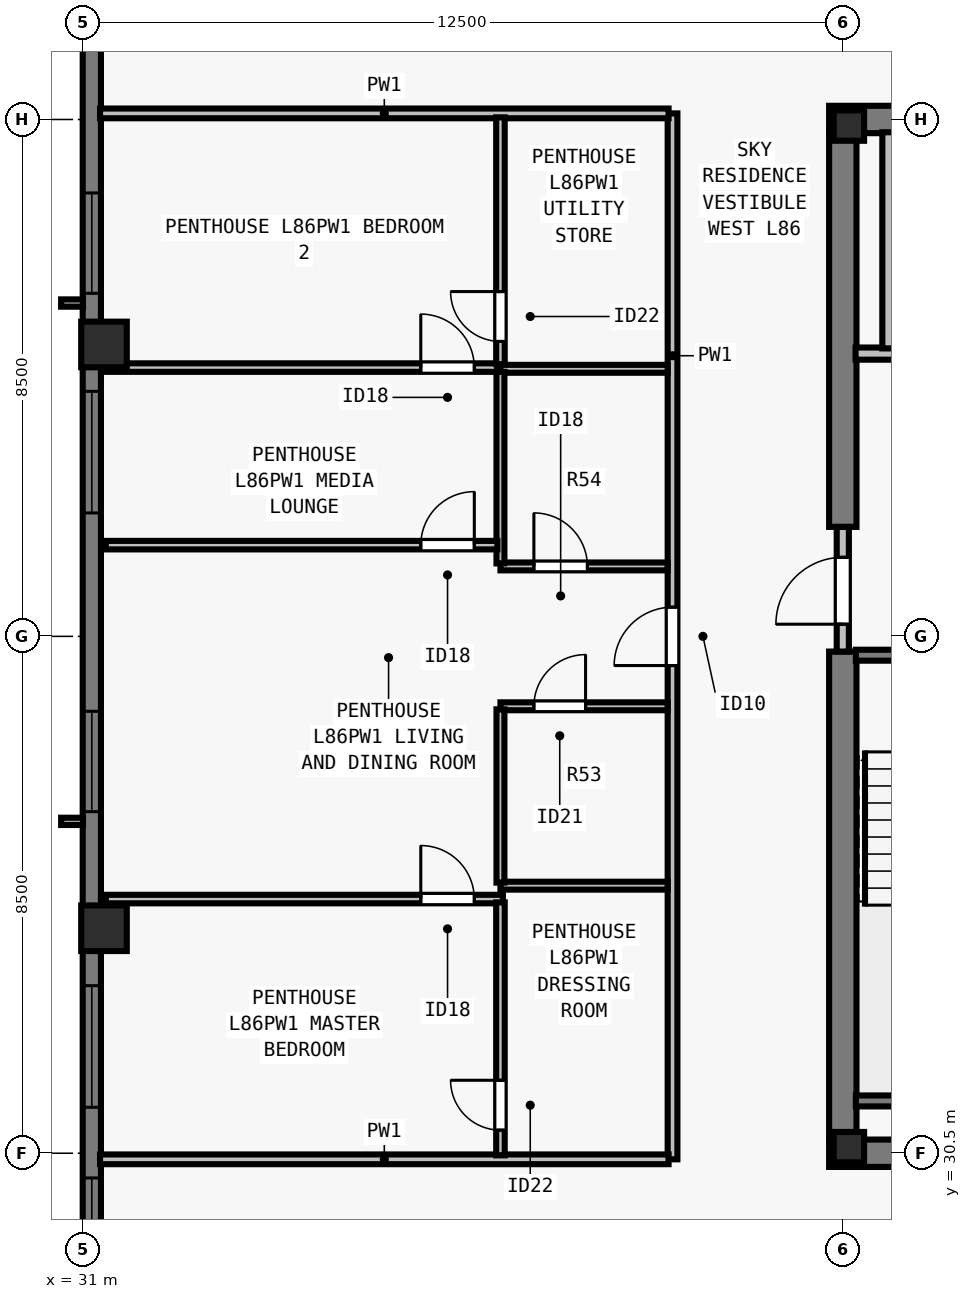
"""IFC4 building model, lengths in metres.
Left out: names, types, materials, properties, quantities, classifications, styles, units other than length and angle.
Written with IfcOpenShell. Run it as: python <this file> out.ifc"""

import sys

from ifc_helpers import new_model, si_unit, direction, frame, frame_2d, origin, origin_2d, place, context, subcontext, project, spatial, rectangle, i_section, extrude, element, fill, save


model = new_model("IFC4")
c1 = context("Model", 3, precision=1e-05, world=origin(), true_north=direction((0.0, 1.0)))
c2 = subcontext(c1, "Body", "Model", "MODEL_VIEW")
j1 = project(units=[si_unit("LENGTHUNIT", "METRE"), si_unit("PLANEANGLEUNIT", "RADIAN")], contexts=[c1])
p1 = place(None, origin())
s1 = spatial("IfcSite", under=j1, at=p1, CompositionType="ELEMENT")
p2 = place(p1, origin())
s2 = spatial("IfcBuilding", under=s1, at=p2, CompositionType="ELEMENT")
p3 = place(p2, frame((0.0, 0.0, 312.0)))
s3 = spatial("IfcBuildingStorey", under=s2, at=p3, CompositionType="ELEMENT", Elevation=312.0)
for number, where, z_axis, x_axis in (
    (1, (43.6, 30.6, 0.0), (0.0, 0.0, 1.0), (1.0, 0.0, 0.0)),
    (2, (43.6, 47.4, 0.0), (0.0, 0.0, 1.0), (1.0, 0.0, 0.0)),
):
    element("IfcColumn", number, at=place(p3, frame(where, z_axis=z_axis, x_axis=x_axis)), inside=s3, PredefinedType="COLUMN", context=c2, shape_type="SweptSolid", body=[
        extrude(i_section(OverallWidth=0.5, OverallDepth=0.5, WebThickness=0.028, FlangeThickness=0.045, at=origin_2d()), origin(), (0.0, 0.0, 1.0), 3.5),
    ])
for number, where, z_axis, x_axis in (
    (3, (31.35, 43.8, 0.0), (0.0, 0.0, 1.0), (0.0, 1.0, 0.0)),
    (4, (31.35, 34.2, 0.0), (0.0, 0.0, 1.0), (0.0, 1.0, 0.0)),
):
    element("IfcColumn", number, at=place(p3, frame(where, z_axis=z_axis, x_axis=x_axis)), inside=s3, PredefinedType="COLUMN", context=c2, shape_type="SweptSolid", body=[
        extrude(rectangle(XDim=0.75, YDim=0.75, at=origin_2d()), origin(), (0.0, 0.0, 1.0), 3.5),
    ])
p4 = place(p3, frame((31.15, 23.5, 0.0), z_axis=(0.0, 0.0, 1.0), x_axis=(0.0, 1.0, 0.0)))
e5 = element("IfcWall", 5, at=p4, inside=s3, PredefinedType="SOLIDWALL", context=c2, shape_type="SweptSolid", body=[
    extrude(rectangle(XDim=30.722, YDim=0.3, at=frame_2d((15.361, 0.0))), origin(), (0.0, 0.0, 1.0), 3.29),
])
p5 = place(p4, frame((4.944, 0.0, 0.8)))
e6 = element("IfcOpeningElement", 6, at=p5, cuts=e5, PredefinedType="OPENING", context=c2, shape_type="SweptSolid", body=[
    extrude(rectangle(XDim=1.65, YDim=1.758, at=frame_2d((0.825, 0.879))), frame((0.0, 0.16, 0.0), z_axis=(0.0, -1.0, 0.0), x_axis=(1.0, 0.0, 0.0)), (0.0, 0.0, 1.0), 0.32),
])
p6 = place(p4, frame((7.756, 0.0, 0.8)))
e7 = element("IfcOpeningElement", 7, at=p6, cuts=e5, PredefinedType="OPENING", context=c2, shape_type="SweptSolid", body=[
    extrude(rectangle(XDim=2.0, YDim=1.758, at=frame_2d((1.0, 0.879))), frame((0.0, 0.16, 0.0), z_axis=(0.0, -1.0, 0.0), x_axis=(1.0, 0.0, 0.0)), (0.0, 0.0, 1.0), 0.32),
])
p7 = place(p4, frame((12.617, 0.0, 0.8)))
e8 = element("IfcOpeningElement", 8, at=p7, cuts=e5, PredefinedType="OPENING", context=c2, shape_type="SweptSolid", body=[
    extrude(rectangle(XDim=1.65, YDim=1.758, at=frame_2d((0.825, 0.879))), frame((0.0, 0.16, 0.0), z_axis=(0.0, -1.0, 0.0), x_axis=(1.0, 0.0, 0.0)), (0.0, 0.0, 1.0), 0.32),
])
p8 = place(p4, frame((17.53, 0.0, 0.8)))
e9 = element("IfcOpeningElement", 9, at=p8, cuts=e5, PredefinedType="OPENING", context=c2, shape_type="SweptSolid", body=[
    extrude(rectangle(XDim=2.0, YDim=1.758, at=frame_2d((1.0, 0.879))), frame((0.0, 0.16, 0.0), z_axis=(0.0, -1.0, 0.0), x_axis=(1.0, 0.0, 0.0)), (0.0, 0.0, 1.0), 0.32),
])
p9 = place(p4, frame((21.142, 0.0, 0.8)))
e10 = element("IfcOpeningElement", 10, at=p9, cuts=e5, PredefinedType="OPENING", context=c2, shape_type="SweptSolid", body=[
    extrude(rectangle(XDim=1.65, YDim=1.758, at=frame_2d((0.825, 0.879))), frame((0.0, 0.16, 0.0), z_axis=(0.0, -1.0, 0.0), x_axis=(1.0, 0.0, 0.0)), (0.0, 0.0, 1.0), 0.32),
])
p10 = place(p4, frame((26.87, 0.0, 0.8)))
e11 = element("IfcOpeningElement", 11, at=p10, cuts=e5, PredefinedType="OPENING", context=c2, shape_type="SweptSolid", body=[
    extrude(rectangle(XDim=0.9, YDim=1.75, at=frame_2d((0.45, 0.875))), frame((0.0, 0.16, 0.0), z_axis=(0.0, -1.0, 0.0), x_axis=(1.0, 0.0, 0.0)), (0.0, 0.0, 1.0), 0.32),
])
for number, where, z_axis, x_axis in (
    (12, (43.275, 30.5, 0.0), (0.0, 0.0, 1.0), (1.0, 0.0, 0.0)),
    (13, (43.275, 47.5, 0.0), (0.0, 0.0, 1.0), (1.0, 0.0, 0.0)),
):
    element("IfcWall", number, at=place(p3, frame(where, z_axis=z_axis, x_axis=x_axis)), inside=s3, PredefinedType="SHEAR", context=c2, shape_type="SweptSolid", body=[
        extrude(rectangle(XDim=17.45, YDim=0.45, at=frame_2d((8.725, 0.0))), origin(), (0.0, 0.0, 1.0), 3.29),
    ])
p11 = place(p3, frame((43.5, 30.715, 0.0), z_axis=(0.0, 0.0, 1.0), x_axis=(0.0, 1.0, 0.0)))
e14 = element("IfcWall", 14, at=p11, inside=s3, PredefinedType="SHEAR", context=c2, shape_type="SweptSolid", body=[
    extrude(rectangle(XDim=8.035, YDim=0.45, at=frame_2d((4.018, 0.0))), origin(), (0.0, 0.0, 1.0), 3.29),
])
p12 = place(p3, frame((43.5, 40.8, 0.0), z_axis=(0.0, 0.0, 1.0), x_axis=(0.0, 1.0, 0.0)))
e15 = element("IfcWall", 15, at=p12, inside=s3, PredefinedType="SHEAR", context=c2, shape_type="SweptSolid", body=[
    extrude(rectangle(XDim=6.485, YDim=0.45, at=frame_2d((3.242, 0.0))), origin(), (0.0, 0.0, 1.0), 3.29),
])
p13 = place(p3, frame((43.5, 38.75, 0.0), z_axis=(0.0, 0.0, 1.0), x_axis=(0.0, 1.0, 0.0)))
e16 = element("IfcWall", 16, at=p13, inside=s3, PredefinedType="SOLIDWALL", context=c2, shape_type="SweptSolid", body=[
    extrude(rectangle(XDim=2.05, YDim=0.2, at=frame_2d((1.025, 0.0))), origin(), (0.0, 0.0, 1.0), 3.29),
])
p14 = place(p13, frame((0.45, 0.0, 0.0)))
e17 = element("IfcOpeningElement", 17, at=p14, cuts=e16, PredefinedType="OPENING", context=c2, shape_type="SweptSolid", body=[
    extrude(rectangle(XDim=1.1, YDim=2.15, at=frame_2d((0.55, 1.075))), frame((0.0, 0.11, 0.0), z_axis=(0.0, -1.0, 0.0), x_axis=(1.0, 0.0, 0.0)), (0.0, 0.0, 1.0), 0.22),
])
p15 = place(p3, frame((43.71, 43.65, 0.0), z_axis=(0.0, 0.0, 1.0), x_axis=(1.0, 0.0, 0.0)))
e18 = element("IfcWall", 18, at=p15, inside=s3, PredefinedType="SOLIDWALL", context=c2, shape_type="SweptSolid", body=[
    extrude(rectangle(XDim=3.555, YDim=0.2, at=frame_2d((1.777, 0.0))), origin(), (0.0, 0.0, 1.0), 3.29),
])
p16 = place(p15, frame((1.16, 0.0, 0.0)))
e19 = element("IfcOpeningElement", 19, at=p16, cuts=e18, PredefinedType="OPENING", context=c2, shape_type="SweptSolid", body=[
    extrude(rectangle(XDim=1.1, YDim=2.2, at=frame_2d((0.55, 1.1))), frame((0.0, 0.11, 0.0), z_axis=(0.0, -1.0, 0.0), x_axis=(1.0, 0.0, 0.0)), (0.0, 0.0, 1.0), 0.22),
])
p17 = place(p3, frame((44.25, 43.735, 0.0), z_axis=(0.0, 0.0, 1.0), x_axis=(0.0, 1.0, 0.0)))
e20 = element("IfcWall", 20, at=p17, inside=s3, PredefinedType="SOLIDWALL", context=c2, shape_type="SweptSolid", body=[
    extrude(rectangle(XDim=3.555, YDim=0.2, at=frame_2d((1.777, 0.0))), origin(), (0.0, 0.0, 1.0), 3.29),
])
p18 = place(p3, frame((40.7, 30.4, 0.0), z_axis=(0.0, 0.0, 1.0), x_axis=(0.0, 1.0, 0.0)))
e21 = element("IfcWall", 21, at=p18, inside=s3, PredefinedType="PARTITIONING", context=c2, shape_type="SweptSolid", body=[
    extrude(rectangle(XDim=17.2, YDim=0.16, at=frame_2d((8.6, 0.0))), origin(), (0.0, 0.0, 1.0), 3.009),
])
p19 = place(p18, frame((8.12, 0.0, 0.0)))
e22 = element("IfcOpeningElement", 22, at=p19, cuts=e21, PredefinedType="OPENING", context=c2, shape_type="SweptSolid", body=[
    extrude(rectangle(XDim=0.96, YDim=2.18, at=frame_2d((0.48, 1.09))), frame((0.0, 0.09, 0.0), z_axis=(0.0, -1.0, 0.0), x_axis=(1.0, 0.0, 0.0)), (0.0, 0.0, 1.0), 0.18),
])
for number, where, z_axis, x_axis in (
    (23, (31.285, 30.4, 0.0), (0.0, 0.0, 1.0), (1.0, 0.0, 0.0)),
    (24, (31.285, 47.6, 0.0), (0.0, 0.0, 1.0), (1.0, 0.0, 0.0)),
):
    element("IfcWall", number, at=place(p3, frame(where, z_axis=z_axis, x_axis=x_axis)), inside=s3, PredefinedType="PARTITIONING", context=c2, shape_type="SweptSolid", body=[
        extrude(rectangle(XDim=9.35, YDim=0.16, at=frame_2d((4.675, 0.0))), origin(), (0.0, 0.0, 1.0), 3.29),
    ])
p20 = place(p3, frame((37.87, 34.9, 0.0), z_axis=(0.0, 0.0, 1.0), x_axis=(1.0, 0.0, 0.0)))
e25 = element("IfcWall", 25, at=p20, inside=s3, PredefinedType="PLUMBINGWALL", context=c2, shape_type="SweptSolid", body=[
    extrude(rectangle(XDim=2.75, YDim=0.13, at=frame_2d((1.375, 0.0))), origin(), (0.0, 0.0, 1.0), 3.29),
])
p21 = place(p3, frame((37.87, 37.85, 0.0), z_axis=(0.0, 0.0, 1.0), x_axis=(1.0, 0.0, 0.0)))
e26 = element("IfcWall", 26, at=p21, inside=s3, PredefinedType="PLUMBINGWALL", context=c2, shape_type="SweptSolid", body=[
    extrude(rectangle(XDim=2.75, YDim=0.13, at=frame_2d((1.375, 0.0))), origin(), (0.0, 0.0, 1.0), 3.29),
])
p22 = place(p21, frame((0.55, 0.0, 0.0)))
e27 = element("IfcOpeningElement", 27, at=p22, cuts=e26, PredefinedType="OPENING", context=c2, shape_type="SweptSolid", body=[
    extrude(rectangle(XDim=0.85, YDim=2.08, at=frame_2d((0.425, 1.04))), frame((0.0, 0.075, 0.0), z_axis=(0.0, -1.0, 0.0), x_axis=(1.0, 0.0, 0.0)), (0.0, 0.0, 1.0), 0.15),
])
p23 = place(p3, frame((37.87, 34.95, 0.0), z_axis=(0.0, 0.0, 1.0), x_axis=(0.0, 1.0, 0.0)))
e28 = element("IfcWall", 28, at=p23, inside=s3, PredefinedType="PLUMBINGWALL", context=c2, shape_type="SweptSolid", body=[
    extrude(rectangle(XDim=2.85, YDim=0.13, at=frame_2d((1.425, 0.0))), origin(), (0.0, 0.0, 1.0), 3.29),
])
p24 = place(p3, frame((37.87, 43.4, 0.0), z_axis=(0.0, 0.0, 1.0), x_axis=(1.0, 0.0, 0.0)))
e29 = element("IfcWall", 29, at=p24, inside=s3, PredefinedType="PLUMBINGWALL", context=c2, shape_type="SweptSolid", body=[
    extrude(rectangle(XDim=2.75, YDim=0.13, at=frame_2d((1.375, 0.0))), origin(), (0.0, 0.0, 1.0), 3.29),
])
p25 = place(p3, frame((37.87, 40.15, 0.0), z_axis=(0.0, 0.0, 1.0), x_axis=(1.0, 0.0, 0.0)))
e30 = element("IfcWall", 30, at=p25, inside=s3, PredefinedType="PLUMBINGWALL", context=c2, shape_type="SweptSolid", body=[
    extrude(rectangle(XDim=2.75, YDim=0.13, at=frame_2d((1.375, 0.0))), origin(), (0.0, 0.0, 1.0), 3.29),
])
p26 = place(p25, frame((0.55, 0.0, 0.0)))
e31 = element("IfcOpeningElement", 31, at=p26, cuts=e30, PredefinedType="OPENING", context=c2, shape_type="SweptSolid", body=[
    extrude(rectangle(XDim=0.88, YDim=2.1, at=frame_2d((0.44, 1.05))), frame((0.0, 0.075, 0.0), z_axis=(0.0, -1.0, 0.0), x_axis=(1.0, 0.0, 0.0)), (0.0, 0.0, 1.0), 0.15),
])
p27 = place(p3, frame((37.87, 40.2, 0.0), z_axis=(0.0, 0.0, 1.0), x_axis=(0.0, 1.0, 0.0)))
e32 = element("IfcWall", 32, at=p27, inside=s3, PredefinedType="PLUMBINGWALL", context=c2, shape_type="SweptSolid", body=[
    extrude(rectangle(XDim=3.15, YDim=0.13, at=frame_2d((1.575, 0.0))), origin(), (0.0, 0.0, 1.0), 3.009),
])
p28 = place(p3, frame((31.38, 34.68, 0.0), z_axis=(0.0, 0.0, 1.0), x_axis=(1.0, 0.0, 0.0)))
e33 = element("IfcWall", 33, at=p28, inside=s3, PredefinedType="PARTITIONING", context=c2, shape_type="SweptSolid", body=[
    extrude(rectangle(XDim=6.53, YDim=0.14, at=frame_2d((3.265, 0.0))), origin(), (0.0, 0.0, 1.0), 3.29),
])
p29 = place(p28, frame((5.18, 0.0, 0.0)))
e34 = element("IfcOpeningElement", 34, at=p29, cuts=e33, PredefinedType="OPENING", context=c2, shape_type="SweptSolid", body=[
    extrude(rectangle(XDim=0.88, YDim=2.1, at=frame_2d((0.44, 1.05))), frame((0.0, 0.08, 0.0), z_axis=(0.0, -1.0, 0.0), x_axis=(1.0, 0.0, 0.0)), (0.0, 0.0, 1.0), 0.16),
])
p30 = place(p3, frame((37.87, 30.465, 0.0), z_axis=(0.0, 0.0, 1.0), x_axis=(0.0, 1.0, 0.0)))
e35 = element("IfcWall", 35, at=p30, inside=s3, PredefinedType="PARTITIONING", context=c2, shape_type="SweptSolid", body=[
    extrude(rectangle(XDim=4.16, YDim=0.14, at=frame_2d((2.08, 0.0))), origin(), (0.0, 0.0, 1.0), 3.29),
])
p31 = place(p30, frame((0.415, 0.0, 0.0)))
e36 = element("IfcOpeningElement", 36, at=p31, cuts=e35, PredefinedType="OPENING", context=c2, shape_type="SweptSolid", body=[
    extrude(rectangle(XDim=0.82, YDim=2.1, at=frame_2d((0.41, 1.05))), frame((0.0, 0.08, 0.0), z_axis=(0.0, -1.0, 0.0), x_axis=(1.0, 0.0, 0.0)), (0.0, 0.0, 1.0), 0.16),
])
p32 = place(p3, frame((31.38, 43.42, 0.0), z_axis=(0.0, 0.0, 1.0), x_axis=(1.0, 0.0, 0.0)))
e37 = element("IfcWall", 37, at=p32, inside=s3, PredefinedType="PARTITIONING", context=c2, shape_type="SweptSolid", body=[
    extrude(rectangle(XDim=6.44, YDim=0.14, at=frame_2d((3.22, 0.0))), origin(), (0.0, 0.0, 1.0), 3.29),
])
p33 = place(p32, frame((5.18, 0.0, 0.0)))
e38 = element("IfcOpeningElement", 38, at=p33, cuts=e37, PredefinedType="OPENING", context=c2, shape_type="SweptSolid", body=[
    extrude(rectangle(XDim=0.88, YDim=2.1, at=frame_2d((0.44, 1.05))), frame((0.0, 0.08, 0.0), z_axis=(0.0, -1.0, 0.0), x_axis=(1.0, 0.0, 0.0)), (0.0, 0.0, 1.0), 0.16),
])
p34 = place(p3, frame((37.87, 43.475, 0.0), z_axis=(0.0, 0.0, 1.0), x_axis=(0.0, 1.0, 0.0)))
e39 = element("IfcWall", 39, at=p34, inside=s3, PredefinedType="PARTITIONING", context=c2, shape_type="SweptSolid", body=[
    extrude(rectangle(XDim=4.06, YDim=0.14, at=frame_2d((2.03, 0.0))), origin(), (0.0, 0.0, 1.0), 3.29),
])
p35 = place(p34, frame((0.375, 0.0, 0.0)))
e40 = element("IfcOpeningElement", 40, at=p35, cuts=e39, PredefinedType="OPENING", context=c2, shape_type="SweptSolid", body=[
    extrude(rectangle(XDim=0.82, YDim=2.1, at=frame_2d((0.41, 1.05))), frame((0.0, 0.08, 0.0), z_axis=(0.0, -1.0, 0.0), x_axis=(1.0, 0.0, 0.0)), (0.0, 0.0, 1.0), 0.16),
])
p36 = place(p3, frame((31.38, 40.5, 0.0), z_axis=(0.0, 0.0, 1.0), x_axis=(1.0, 0.0, 0.0)))
e41 = element("IfcWall", 41, at=p36, inside=s3, PredefinedType="PARTITIONING", context=c2, shape_type="SweptSolid", body=[
    extrude(rectangle(XDim=6.44, YDim=0.14, at=frame_2d((3.22, 0.0))), origin(), (0.0, 0.0, 1.0), 3.29),
])
p37 = place(p36, frame((5.18, 0.0, 0.0)))
e42 = element("IfcOpeningElement", 42, at=p37, cuts=e41, PredefinedType="OPENING", context=c2, shape_type="SweptSolid", body=[
    extrude(rectangle(XDim=0.88, YDim=2.1, at=frame_2d((0.44, 1.05))), frame((0.0, 0.08, 0.0), z_axis=(0.0, -1.0, 0.0), x_axis=(1.0, 0.0, 0.0)), (0.0, 0.0, 1.0), 0.16),
])
p38 = place(p3, frame((43.715, 38.69, 0.0), z_axis=(0.0, 0.0, 1.0), x_axis=(1.0, 0.0, 0.0)))
e43 = element("IfcWall", 43, at=p38, inside=s3, PredefinedType="SOLIDWALL", context=c2, shape_type="SweptSolid", body=[
    extrude(rectangle(XDim=3.28, YDim=0.18, at=frame_2d((1.64, 0.0))), origin(), (0.0, 0.0, 1.0), 3.29),
])
p39 = place(p38, frame((1.165, 0.0, 0.0)))
e44 = element("IfcOpeningElement", 44, at=p39, cuts=e43, PredefinedType="OPENING", context=c2, shape_type="SweptSolid", body=[
    extrude(rectangle(XDim=0.95, YDim=2.15, at=frame_2d((0.475, 1.075))), frame((0.0, 0.1, 0.0), z_axis=(0.0, -1.0, 0.0), x_axis=(1.0, 0.0, 0.0)), (0.0, 0.0, 1.0), 0.2),
])
p40 = place(p3, frame((43.715, 31.36, 0.0), z_axis=(0.0, 0.0, 1.0), x_axis=(1.0, 0.0, 0.0)))
e45 = element("IfcWall", 45, at=p40, inside=s3, PredefinedType="SOLIDWALL", context=c2, shape_type="SweptSolid", body=[
    extrude(rectangle(XDim=3.28, YDim=0.18, at=frame_2d((1.64, 0.0))), origin(), (0.0, 0.0, 1.0), 3.29),
])
p41 = place(p5, origin())
e46 = element("IfcWindow", 46, at=p41, inside=s3, PartitioningType="SINGLE_PANEL", PredefinedType="WINDOW", context=c2, shape_type="SweptSolid", body=[
    extrude(rectangle(XDim=1.65, YDim=1.758, at=frame_2d((0.825, 0.879))), frame((0.0, -0.05, 0.0), z_axis=(0.0, -1.0, 0.0), x_axis=(1.0, 0.0, 0.0)), (0.0, 0.0, 1.0), 0.06),
])
fill(e6, e46)
p42 = place(p6, origin())
e47 = element("IfcWindow", 47, at=p42, inside=s3, PartitioningType="SINGLE_PANEL", PredefinedType="WINDOW", context=c2, shape_type="SweptSolid", body=[
    extrude(rectangle(XDim=2.0, YDim=1.758, at=frame_2d((1.0, 0.879))), frame((0.0, -0.05, 0.0), z_axis=(0.0, -1.0, 0.0), x_axis=(1.0, 0.0, 0.0)), (0.0, 0.0, 1.0), 0.06),
])
fill(e7, e47)
p43 = place(p7, origin())
e48 = element("IfcWindow", 48, at=p43, inside=s3, PartitioningType="SINGLE_PANEL", PredefinedType="WINDOW", context=c2, shape_type="SweptSolid", body=[
    extrude(rectangle(XDim=1.65, YDim=1.758, at=frame_2d((0.825, 0.879))), frame((0.0, -0.05, 0.0), z_axis=(0.0, -1.0, 0.0), x_axis=(1.0, 0.0, 0.0)), (0.0, 0.0, 1.0), 0.06),
])
fill(e8, e48)
p44 = place(p8, origin())
e49 = element("IfcWindow", 49, at=p44, inside=s3, PartitioningType="SINGLE_PANEL", PredefinedType="WINDOW", context=c2, shape_type="SweptSolid", body=[
    extrude(rectangle(XDim=2.0, YDim=1.758, at=frame_2d((1.0, 0.879))), frame((0.0, -0.05, 0.0), z_axis=(0.0, -1.0, 0.0), x_axis=(1.0, 0.0, 0.0)), (0.0, 0.0, 1.0), 0.06),
])
fill(e9, e49)
p45 = place(p9, origin())
e50 = element("IfcWindow", 50, at=p45, inside=s3, PartitioningType="SINGLE_PANEL", PredefinedType="WINDOW", context=c2, shape_type="SweptSolid", body=[
    extrude(rectangle(XDim=1.65, YDim=1.758, at=frame_2d((0.825, 0.879))), frame((0.0, -0.05, 0.0), z_axis=(0.0, -1.0, 0.0), x_axis=(1.0, 0.0, 0.0)), (0.0, 0.0, 1.0), 0.06),
])
fill(e10, e50)
p46 = place(p14, origin())
e51 = element("IfcDoor", 51, at=p46, inside=s3, OperationType="SINGLE_SWING_LEFT", PredefinedType="DOOR", context=c2, shape_type="SweptSolid", body=[
    extrude(rectangle(XDim=1.1, YDim=2.15, at=frame_2d((0.55, 1.075))), frame((0.0, 0.025, 0.0), z_axis=(0.0, -1.0, 0.0), x_axis=(1.0, 0.0, 0.0)), (0.0, 0.0, 1.0), 0.05),
])
fill(e17, e51)
p47 = place(p22, origin())
e52 = element("IfcDoor", 52, at=p47, inside=s3, OperationType="SINGLE_SWING_RIGHT", PredefinedType="DOOR", context=c2, shape_type="SweptSolid", body=[
    extrude(rectangle(XDim=0.85, YDim=2.08, at=frame_2d((0.425, 1.04))), frame((0.0, 0.025, 0.0), z_axis=(0.0, -1.0, 0.0), x_axis=(1.0, 0.0, 0.0)), (0.0, 0.0, 1.0), 0.05),
])
fill(e27, e52)
p48 = place(p26, origin())
e53 = element("IfcDoor", 53, at=p48, inside=s3, OperationType="SINGLE_SWING_LEFT", PredefinedType="DOOR", context=c2, shape_type="SweptSolid", body=[
    extrude(rectangle(XDim=0.88, YDim=2.1, at=frame_2d((0.44, 1.05))), frame((0.0, 0.025, 0.0), z_axis=(0.0, -1.0, 0.0), x_axis=(1.0, 0.0, 0.0)), (0.0, 0.0, 1.0), 0.05),
])
fill(e31, e53)
p49 = place(p31, origin())
e54 = element("IfcDoor", 54, at=p49, inside=s3, OperationType="SINGLE_SWING_RIGHT", PredefinedType="DOOR", context=c2, shape_type="SweptSolid", body=[
    extrude(rectangle(XDim=0.82, YDim=2.1, at=frame_2d((0.41, 1.05))), frame((0.0, 0.025, 0.0), z_axis=(0.0, -1.0, 0.0), x_axis=(1.0, 0.0, 0.0)), (0.0, 0.0, 1.0), 0.05),
])
fill(e36, e54)
p50 = place(p29, origin())
e55 = element("IfcDoor", 55, at=p50, inside=s3, OperationType="SINGLE_SWING_LEFT", PredefinedType="DOOR", context=c2, shape_type="SweptSolid", body=[
    extrude(rectangle(XDim=0.88, YDim=2.1, at=frame_2d((0.44, 1.05))), frame((0.0, 0.025, 0.0), z_axis=(0.0, -1.0, 0.0), x_axis=(1.0, 0.0, 0.0)), (0.0, 0.0, 1.0), 0.05),
])
fill(e34, e55)
p51 = place(p35, origin())
e56 = element("IfcDoor", 56, at=p51, inside=s3, OperationType="SINGLE_SWING_RIGHT", PredefinedType="DOOR", context=c2, shape_type="SweptSolid", body=[
    extrude(rectangle(XDim=0.82, YDim=2.1, at=frame_2d((0.41, 1.05))), frame((0.0, 0.025, 0.0), z_axis=(0.0, -1.0, 0.0), x_axis=(1.0, 0.0, 0.0)), (0.0, 0.0, 1.0), 0.05),
])
fill(e40, e56)
p52 = place(p33, origin())
e57 = element("IfcDoor", 57, at=p52, inside=s3, OperationType="SINGLE_SWING_LEFT", PredefinedType="DOOR", context=c2, shape_type="SweptSolid", body=[
    extrude(rectangle(XDim=0.88, YDim=2.1, at=frame_2d((0.44, 1.05))), frame((0.0, 0.025, 0.0), z_axis=(0.0, -1.0, 0.0), x_axis=(1.0, 0.0, 0.0)), (0.0, 0.0, 1.0), 0.05),
])
fill(e38, e57)
p53 = place(p37, origin())
e58 = element("IfcDoor", 58, at=p53, inside=s3, OperationType="SINGLE_SWING_RIGHT", PredefinedType="DOOR", context=c2, shape_type="SweptSolid", body=[
    extrude(rectangle(XDim=0.88, YDim=2.1, at=frame_2d((0.44, 1.05))), frame((0.0, 0.025, 0.0), z_axis=(0.0, -1.0, 0.0), x_axis=(1.0, 0.0, 0.0)), (0.0, 0.0, 1.0), 0.05),
])
fill(e42, e58)
p54 = place(p19, origin())
e59 = element("IfcDoor", 59, at=p54, inside=s3, OperationType="SINGLE_SWING_LEFT", PredefinedType="DOOR", context=c2, shape_type="SweptSolid", body=[
    extrude(rectangle(XDim=0.96, YDim=2.18, at=frame_2d((0.48, 1.09))), frame((0.0, 0.025, 0.0), z_axis=(0.0, -1.0, 0.0), x_axis=(1.0, 0.0, 0.0)), (0.0, 0.0, 1.0), 0.05),
])
fill(e22, e59)
save(model, sys.argv[1])
